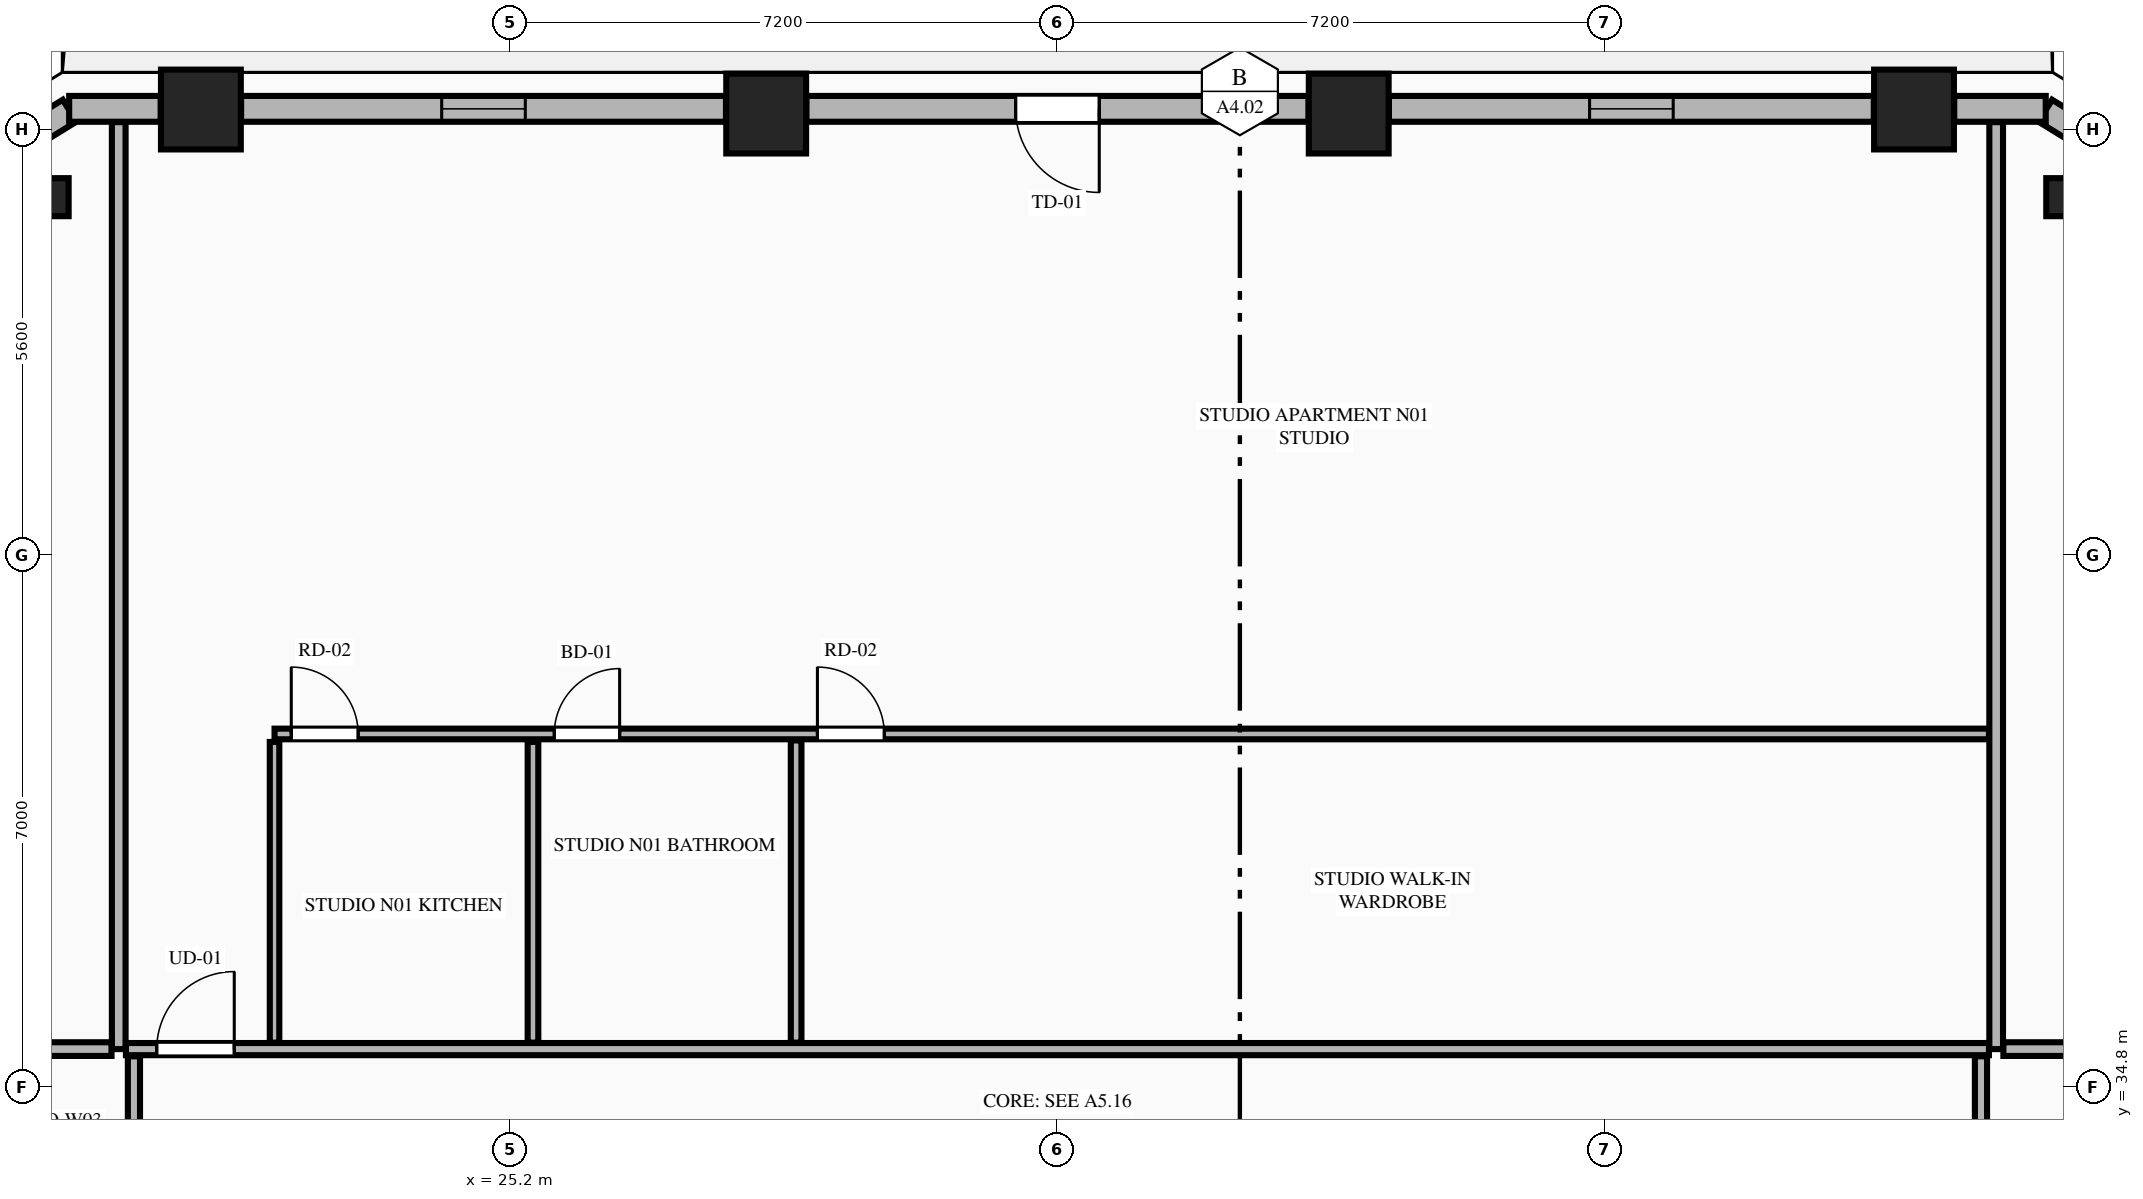
"""IFC4 building model, lengths in metres.
Left out: names, types, materials, properties, quantities, classifications, styles, units other than length and angle.
Written with IfcOpenShell. Run it as: python <this file> out.ifc"""

import sys

from ifc_helpers import new_model, si_unit, direction, frame, frame_2d, origin, origin_2d, place, context, subcontext, project, spatial, rectangle, extrude, element, fill, save


model = new_model("IFC4")
c1 = context("Model", 3, precision=1e-05, world=origin(), true_north=direction((0.0, 1.0)))
c2 = subcontext(c1, "Body", "Model", "MODEL_VIEW")
j1 = project(units=[si_unit("LENGTHUNIT", "METRE"), si_unit("PLANEANGLEUNIT", "RADIAN")], contexts=[c1])
p1 = place(None, origin())
s1 = spatial("IfcSite", under=j1, at=p1, CompositionType="ELEMENT")
p2 = place(p1, origin())
s2 = spatial("IfcBuilding", under=s1, at=p2, CompositionType="ELEMENT")
p3 = place(p2, frame((0.0, 0.0, 119.7)))
s3 = spatial("IfcBuildingStorey", under=s2, at=p3, CompositionType="ELEMENT", Elevation=119.7)
for number, where, z_axis, x_axis in (
    (1, (43.669, 47.661, 0.0), (0.0, 0.0, 1.0), (1.0, 0.0, 0.0)),
    (2, (36.232, 47.608, 0.0), (0.0, 0.0, 1.0), (1.0, 0.0, 0.0)),
    (3, (28.568, 47.608, 0.0), (0.0, 0.0, 1.0), (1.0, 0.0, 0.0)),
    (4, (21.131, 47.661, 0.0), (0.0, 0.0, 1.0), (1.0, 0.0, 0.0)),
):
    element("IfcColumn", number, at=place(p3, frame(where, z_axis=z_axis, x_axis=x_axis)), inside=s3, PredefinedType="COLUMN", context=c2, shape_type="SweptSolid", body=[
        extrude(rectangle(XDim=1.05, YDim=1.05, at=origin_2d()), origin(), (0.0, 0.0, 1.0), 3.55),
    ])
for number, where, z_axis, x_axis in (
    (5, (45.659, 46.508, 0.0), (0.0, 0.0, 1.0), (-0.865, 0.501, 0.0)),
    (6, (19.141, 46.508, 0.0), (0.0, 0.0, 1.0), (-0.865, -0.501, 0.0)),
):
    element("IfcColumn", number, at=place(p3, frame(where, z_axis=z_axis, x_axis=x_axis)), inside=s3, PredefinedType="PILASTER", context=c2, shape_type="SweptSolid", body=[
        extrude(rectangle(XDim=0.5, YDim=0.35, at=origin_2d()), origin(), (0.0, 0.0, 1.0), 3.55),
    ])
for number, where, z_axis, x_axis in (
    (7, (46.971, 46.677, 0.0), (0.0, 0.0, 1.0), (-0.852, 0.524, 0.0)),
    (8, (19.403, 47.645, 0.0), (0.0, 0.0, 1.0), (-0.852, -0.524, 0.0)),
):
    element("IfcWall", number, at=place(p3, frame(where, z_axis=z_axis, x_axis=x_axis)), inside=s3, PredefinedType="STANDARD", context=c2, shape_type="SweptSolid", body=[
        extrude(rectangle(XDim=1.848, YDim=0.34, at=frame_2d((0.924, 0.0))), origin(), (0.0, 0.0, 1.0), 3.34),
    ])
p4 = place(p3, frame((45.402, 47.67, 0.0), z_axis=(0.0, 0.0, 1.0), x_axis=(-1.0, 0.0, 0.0)))
e9 = element("IfcWall", 9, at=p4, inside=s3, PredefinedType="STANDARD", context=c2, shape_type="SweptSolid", body=[
    extrude(rectangle(XDim=1.204, YDim=0.34, at=frame_2d((0.602, 0.0))), origin(), (0.0, 0.0, 1.0), 3.34),
])
p5 = place(p3, frame((43.14, 47.67, 0.0), z_axis=(0.0, 0.0, 1.0), x_axis=(-1.0, 0.0, 0.0)))
e10 = element("IfcWall", 10, at=p5, inside=s3, PredefinedType="STANDARD", context=c2, shape_type="SweptSolid", body=[
    extrude(rectangle(XDim=6.379, YDim=0.34, at=frame_2d((3.189, 0.0))), origin(), (0.0, 0.0, 1.0), 2.797),
])
p6 = place(p5, frame((2.639, 0.0, 0.75)))
e11 = element("IfcOpeningElement", 11, at=p6, cuts=e10, PredefinedType="OPENING", context=c2, shape_type="SweptSolid", body=[
    extrude(rectangle(XDim=1.1, YDim=1.897, at=frame_2d((0.55, 0.948))), frame((0.0, 0.18, 0.0), z_axis=(0.0, -1.0, 0.0), x_axis=(1.0, 0.0, 0.0)), (0.0, 0.0, 1.0), 0.36),
])
p7 = place(p3, frame((35.703, 47.67, 0.0), z_axis=(0.0, 0.0, 1.0), x_axis=(-1.0, 0.0, 0.0)))
e12 = element("IfcWall", 12, at=p7, inside=s3, PredefinedType="STANDARD", context=c2, shape_type="SweptSolid", body=[
    extrude(rectangle(XDim=6.606, YDim=0.34, at=frame_2d((3.303, 0.0))), origin(), (0.0, 0.0, 1.0), 2.797),
])
p8 = place(p7, frame((2.753, 0.0, 0.0)))
e13 = element("IfcOpeningElement", 13, at=p8, cuts=e12, PredefinedType="OPENING", context=c2, shape_type="SweptSolid", body=[
    extrude(rectangle(XDim=1.1, YDim=2.25, at=frame_2d((0.55, 1.125))), frame((0.0, 0.18, 0.0), z_axis=(0.0, -1.0, 0.0), x_axis=(1.0, 0.0, 0.0)), (0.0, 0.0, 1.0), 0.36),
])
p9 = place(p3, frame((28.039, 47.67, 0.0), z_axis=(0.0, 0.0, 1.0), x_axis=(-1.0, 0.0, 0.0)))
e14 = element("IfcWall", 14, at=p9, inside=s3, PredefinedType="STANDARD", context=c2, shape_type="SweptSolid", body=[
    extrude(rectangle(XDim=6.379, YDim=0.34, at=frame_2d((3.189, 0.0))), origin(), (0.0, 0.0, 1.0), 2.797),
])
p10 = place(p9, frame((2.64, 0.0, 0.75)))
e15 = element("IfcOpeningElement", 15, at=p10, cuts=e14, PredefinedType="OPENING", context=c2, shape_type="SweptSolid", body=[
    extrude(rectangle(XDim=1.1, YDim=1.897, at=frame_2d((0.55, 0.948))), frame((0.0, 0.18, 0.0), z_axis=(0.0, -1.0, 0.0), x_axis=(1.0, 0.0, 0.0)), (0.0, 0.0, 1.0), 0.36),
])
p11 = place(p3, frame((20.602, 47.67, 0.0), z_axis=(0.0, 0.0, 1.0), x_axis=(-1.0, 0.0, 0.0)))
e16 = element("IfcWall", 16, at=p11, inside=s3, PredefinedType="STANDARD", context=c2, shape_type="SweptSolid", body=[
    extrude(rectangle(XDim=1.204, YDim=0.34, at=frame_2d((0.602, 0.0))), origin(), (0.0, 0.0, 1.0), 3.34),
])
for number, where, z_axis, x_axis in (
    (17, (20.05, 35.3, 0.0), (0.0, 0.0, 1.0), (0.0, 1.0, 0.0)),
    (18, (44.75, 35.3, 0.0), (0.0, 0.0, 1.0), (0.0, 1.0, 0.0)),
):
    element("IfcWall", number, at=place(p3, frame(where, z_axis=z_axis, x_axis=x_axis)), inside=s3, PredefinedType="PARTITIONING", context=c2, shape_type="SweptSolid", body=[
        extrude(rectangle(XDim=12.195, YDim=0.18, at=frame_2d((6.098, 0.0))), origin(), (0.0, 0.0, 1.0), 3.34),
    ])
p12 = place(p3, frame((20.145, 35.3, 0.0), z_axis=(0.0, 0.0, 1.0), x_axis=(1.0, 0.0, 0.0)))
e19 = element("IfcWall", 19, at=p12, inside=s3, PredefinedType="PARTITIONING", context=c2, shape_type="SweptSolid", body=[
    extrude(rectangle(XDim=24.51, YDim=0.16, at=frame_2d((12.255, 0.0))), origin(), (0.0, 0.0, 1.0), 3.34),
])
p13 = place(p12, frame((0.405, 0.0, 0.0)))
e20 = element("IfcOpeningElement", 20, at=p13, cuts=e19, PredefinedType="OPENING", context=c2, shape_type="SweptSolid", body=[
    extrude(rectangle(XDim=1.02, YDim=2.25, at=frame_2d((0.51, 1.125))), frame((0.0, 0.09, 0.0), z_axis=(0.0, -1.0, 0.0), x_axis=(1.0, 0.0, 0.0)), (0.0, 0.0, 1.0), 0.18),
])
p14 = place(p3, frame((22.1, 35.385, 0.0), z_axis=(0.0, 0.0, 1.0), x_axis=(0.0, 1.0, 0.0)))
e21 = element("IfcWall", 21, at=p14, inside=s3, PredefinedType="PARTITIONING", context=c2, shape_type="SweptSolid", body=[
    extrude(rectangle(XDim=3.956, YDim=0.125, at=frame_2d((1.978, 0.0))), origin(), (0.0, 0.0, 1.0), 2.722),
])
p15 = place(p3, frame((22.1, 39.446, 0.0), z_axis=(0.0, 0.0, 1.0), x_axis=(1.0, 0.0, 0.0)))
e22 = element("IfcWall", 22, at=p15, inside=s3, PredefinedType="PLUMBINGWALL", context=c2, shape_type="SweptSolid", body=[
    extrude(rectangle(XDim=22.555, YDim=0.14, at=frame_2d((11.277, 0.0))), origin(), (0.0, 0.0, 1.0), 3.34),
])
p16 = place(p15, frame((3.68, 0.0, 0.0)))
e23 = element("IfcOpeningElement", 23, at=p16, cuts=e22, PredefinedType="OPENING", context=c2, shape_type="SweptSolid", body=[
    extrude(rectangle(XDim=0.86, YDim=2.1, at=frame_2d((0.43, 1.05))), frame((0.0, 0.08, 0.0), z_axis=(0.0, -1.0, 0.0), x_axis=(1.0, 0.0, 0.0)), (0.0, 0.0, 1.0), 0.16),
])
p17 = place(p15, frame((7.142, 0.0, 0.0)))
e24 = element("IfcOpeningElement", 24, at=p17, cuts=e22, PredefinedType="OPENING", context=c2, shape_type="SweptSolid", body=[
    extrude(rectangle(XDim=0.88, YDim=2.15, at=frame_2d((0.44, 1.075))), frame((0.0, 0.08, 0.0), z_axis=(0.0, -1.0, 0.0), x_axis=(1.0, 0.0, 0.0)), (0.0, 0.0, 1.0), 0.16),
])
p18 = place(p15, frame((0.22, 0.0, 0.0)))
e25 = element("IfcOpeningElement", 25, at=p18, cuts=e22, PredefinedType="OPENING", context=c2, shape_type="SweptSolid", body=[
    extrude(rectangle(XDim=0.88, YDim=2.15, at=frame_2d((0.44, 1.075))), frame((0.0, 0.08, 0.0), z_axis=(0.0, -1.0, 0.0), x_axis=(1.0, 0.0, 0.0)), (0.0, 0.0, 1.0), 0.16),
])
p19 = place(p3, frame((25.5, 35.385, 0.0), z_axis=(0.0, 0.0, 1.0), x_axis=(0.0, 1.0, 0.0)))
e26 = element("IfcWall", 26, at=p19, inside=s3, PredefinedType="PLUMBINGWALL", context=c2, shape_type="SweptSolid", body=[
    extrude(rectangle(XDim=3.956, YDim=0.14, at=frame_2d((1.978, 0.0))), origin(), (0.0, 0.0, 1.0), 3.34),
])
p20 = place(p3, frame((28.962, 35.385, 0.0), z_axis=(0.0, 0.0, 1.0), x_axis=(0.0, 1.0, 0.0)))
e27 = element("IfcWall", 27, at=p20, inside=s3, PredefinedType="PLUMBINGWALL", context=c2, shape_type="SweptSolid", body=[
    extrude(rectangle(XDim=3.976, YDim=0.14, at=frame_2d((1.988, 0.0))), origin(), (0.0, 0.0, 1.0), 3.34),
])
p21 = place(p3, frame((12.286, 35.3, 0.0), z_axis=(0.0, 0.0, 1.0), x_axis=(1.0, 0.0, 0.0)))
e28 = element("IfcWall", 28, at=p21, inside=s3, PredefinedType="PARTITIONING", context=c2, shape_type="SweptSolid", body=[
    extrude(rectangle(XDim=7.669, YDim=0.18, at=frame_2d((3.834, 0.0))), origin(), (0.0, 0.0, 1.0), 3.34),
])
p22 = place(p3, frame((44.845, 35.3, 0.0), z_axis=(0.0, 0.0, 1.0), x_axis=(1.0, 0.0, 0.0)))
e29 = element("IfcWall", 29, at=p22, inside=s3, PredefinedType="PARTITIONING", context=c2, shape_type="SweptSolid", body=[
    extrude(rectangle(XDim=7.669, YDim=0.18, at=frame_2d((3.834, 0.0))), origin(), (0.0, 0.0, 1.0), 3.34),
])
p23 = place(p3, frame((20.25, 29.191, 0.0), z_axis=(0.0, 0.0, 1.0), x_axis=(0.0, 1.0, 0.0)))
e30 = element("IfcWall", 30, at=p23, inside=s3, PredefinedType="PARTITIONING", context=c2, shape_type="SweptSolid", body=[
    extrude(rectangle(XDim=6.014, YDim=0.16, at=frame_2d((3.007, 0.0))), origin(), (0.0, 0.0, 1.0), 3.34),
])
p24 = place(p23, frame((0.4, 0.0, 0.0)))
e31 = element("IfcOpeningElement", 31, at=p24, cuts=e30, PredefinedType="OPENING", context=c2, shape_type="SweptSolid", body=[
    extrude(rectangle(XDim=1.02, YDim=2.25, at=frame_2d((0.51, 1.125))), frame((0.0, 0.09, 0.0), z_axis=(0.0, -1.0, 0.0), x_axis=(1.0, 0.0, 0.0)), (0.0, 0.0, 1.0), 0.18),
])
p25 = place(p3, frame((44.55, 26.371, 0.0), z_axis=(0.0, 0.0, 1.0), x_axis=(0.0, 1.0, 0.0)))
e32 = element("IfcWall", 32, at=p25, inside=s3, PredefinedType="PARTITIONING", context=c2, shape_type="SweptSolid", body=[
    extrude(rectangle(XDim=8.834, YDim=0.16, at=frame_2d((4.417, 0.0))), origin(), (0.0, 0.0, 1.0), 3.34),
])
p26 = place(p25, frame((0.4, 0.0, 0.0)))
e33 = element("IfcOpeningElement", 33, at=p26, cuts=e32, PredefinedType="OPENING", context=c2, shape_type="SweptSolid", body=[
    extrude(rectangle(XDim=1.02, YDim=2.25, at=frame_2d((0.51, 1.125))), frame((0.0, 0.09, 0.0), z_axis=(0.0, -1.0, 0.0), x_axis=(1.0, 0.0, 0.0)), (0.0, 0.0, 1.0), 0.18),
])
p27 = place(p6, origin())
e34 = element("IfcWindow", 34, at=p27, inside=s3, PartitioningType="SINGLE_PANEL", PredefinedType="WINDOW", context=c2, shape_type="SweptSolid", body=[
    extrude(rectangle(XDim=1.1, YDim=1.897, at=frame_2d((0.55, 0.948))), frame((0.0, 0.03, 0.0), z_axis=(0.0, -1.0, 0.0), x_axis=(1.0, 0.0, 0.0)), (0.0, 0.0, 1.0), 0.06),
])
fill(e11, e34)
p28 = place(p8, origin())
e35 = element("IfcDoor", 35, at=p28, inside=s3, OperationType="SINGLE_SWING_LEFT", PredefinedType="DOOR", context=c2, shape_type="SweptSolid", body=[
    extrude(rectangle(XDim=1.1, YDim=2.25, at=frame_2d((0.55, 1.125))), frame((0.0, 0.025, 0.0), z_axis=(0.0, -1.0, 0.0), x_axis=(1.0, 0.0, 0.0)), (0.0, 0.0, 1.0), 0.05),
])
fill(e13, e35)
p29 = place(p10, origin())
e36 = element("IfcWindow", 36, at=p29, inside=s3, PartitioningType="SINGLE_PANEL", PredefinedType="WINDOW", context=c2, shape_type="SweptSolid", body=[
    extrude(rectangle(XDim=1.1, YDim=1.897, at=frame_2d((0.55, 0.948))), frame((0.0, 0.03, 0.0), z_axis=(0.0, -1.0, 0.0), x_axis=(1.0, 0.0, 0.0)), (0.0, 0.0, 1.0), 0.06),
])
fill(e15, e36)
p30 = place(p16, origin())
e37 = element("IfcDoor", 37, at=p30, inside=s3, OperationType="SINGLE_SWING_RIGHT", PredefinedType="DOOR", context=c2, shape_type="SweptSolid", body=[
    extrude(rectangle(XDim=0.86, YDim=2.1, at=frame_2d((0.43, 1.05))), frame((0.0, 0.025, 0.0), z_axis=(0.0, -1.0, 0.0), x_axis=(1.0, 0.0, 0.0)), (0.0, 0.0, 1.0), 0.05),
])
fill(e23, e37)
p31 = place(p17, origin())
e38 = element("IfcDoor", 38, at=p31, inside=s3, OperationType="SINGLE_SWING_LEFT", PredefinedType="DOOR", context=c2, shape_type="SweptSolid", body=[
    extrude(rectangle(XDim=0.88, YDim=2.15, at=frame_2d((0.44, 1.075))), frame((0.0, 0.025, 0.0), z_axis=(0.0, -1.0, 0.0), x_axis=(1.0, 0.0, 0.0)), (0.0, 0.0, 1.0), 0.05),
])
fill(e24, e38)
p32 = place(p13, origin())
e39 = element("IfcDoor", 39, at=p32, inside=s3, OperationType="SINGLE_SWING_RIGHT", PredefinedType="DOOR", context=c2, shape_type="SweptSolid", body=[
    extrude(rectangle(XDim=1.02, YDim=2.25, at=frame_2d((0.51, 1.125))), frame((0.0, 0.025, 0.0), z_axis=(0.0, -1.0, 0.0), x_axis=(1.0, 0.0, 0.0)), (0.0, 0.0, 1.0), 0.05),
])
fill(e20, e39)
p33 = place(p18, origin())
e40 = element("IfcDoor", 40, at=p33, inside=s3, OperationType="SINGLE_SWING_LEFT", PredefinedType="DOOR", context=c2, shape_type="SweptSolid", body=[
    extrude(rectangle(XDim=0.88, YDim=2.15, at=frame_2d((0.44, 1.075))), frame((0.0, 0.025, 0.0), z_axis=(0.0, -1.0, 0.0), x_axis=(1.0, 0.0, 0.0)), (0.0, 0.0, 1.0), 0.05),
])
fill(e25, e40)
save(model, sys.argv[1])
